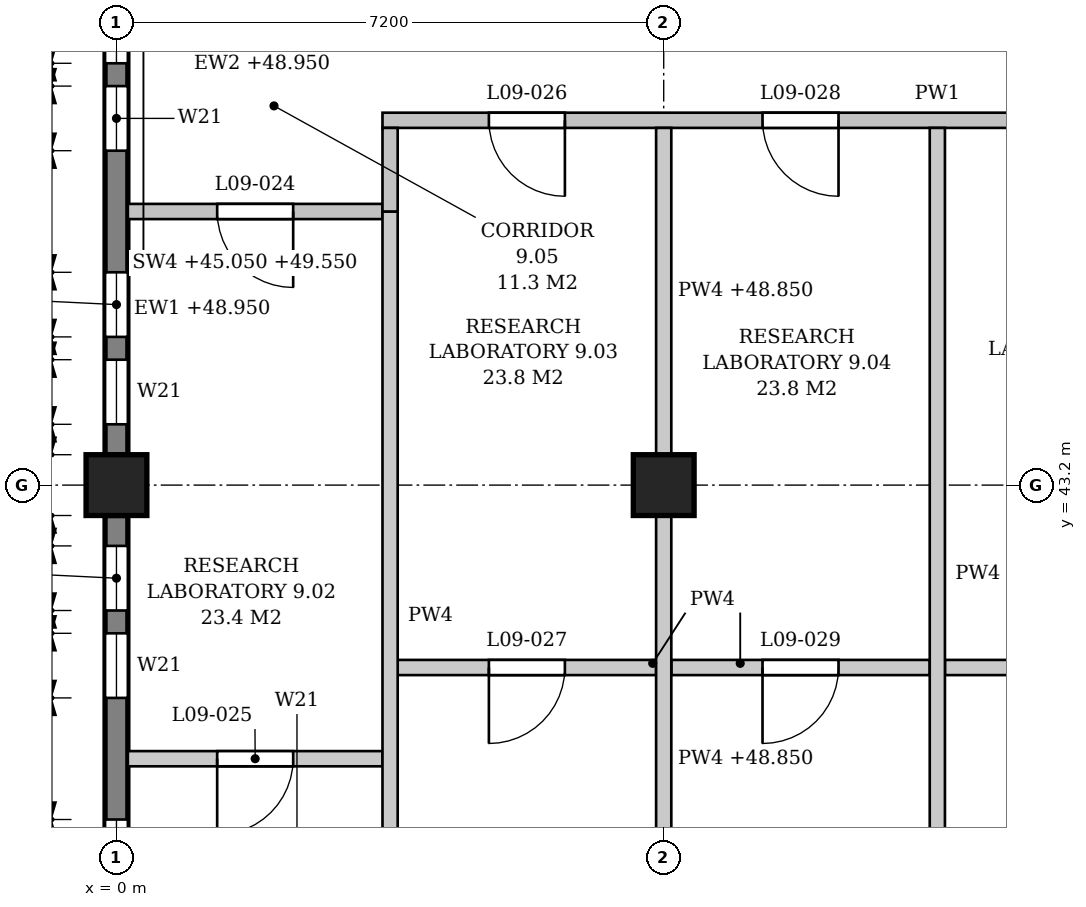
"""IFC4 building model, lengths in metres.
Left out: names, types, materials, properties, quantities, classifications, styles, units other than length and angle.
Written with IfcOpenShell. Run it as: python <this file> out.ifc"""

import sys

from ifc_helpers import new_model, si_unit, direction, frame, frame_2d, origin, origin_2d, place, context, subcontext, project, spatial, polyline, rectangle, outline, extrude, element, fill, save


model = new_model("IFC4")
c1 = context("Model", 3, precision=1e-05, world=origin(), true_north=direction((0.0, 1.0)))
c2 = subcontext(c1, "Body", "Model", "MODEL_VIEW")
j1 = project(units=[si_unit("LENGTHUNIT", "METRE"), si_unit("PLANEANGLEUNIT", "RADIAN")], contexts=[c1])
p1 = place(None, origin())
s1 = spatial("IfcSite", under=j1, at=p1, CompositionType="ELEMENT")
p2 = place(p1, origin())
s2 = spatial("IfcBuilding", under=s1, at=p2, CompositionType="ELEMENT")
p3 = place(p2, frame((0.0, 0.0, 45.3)))
s3 = spatial("IfcBuildingStorey", under=s2, at=p3, CompositionType="ELEMENT", Elevation=45.3)
for number, where, z_axis, x_axis in (
    (1, (0.0, 43.2, 0.0), (0.0, 0.0, 1.0), (1.0, 0.0, 0.0)),
    (2, (7.2, 43.2, 0.0), (0.0, 0.0, 1.0), (1.0, 0.0, 0.0)),
):
    element("IfcColumn", number, at=place(p3, frame(where, z_axis=z_axis, x_axis=x_axis)), inside=s3, PredefinedType="COLUMN", context=c2, shape_type="SweptSolid", body=[
        extrude(rectangle(XDim=0.8, YDim=0.8, at=origin_2d()), origin(), (0.0, 0.0, 1.0), 4.5),
    ])
p4 = place(p3, frame((0.0, 36.4, 0.0), z_axis=(0.0, 0.0, 1.0), x_axis=(0.0, 1.0, 0.0)))
e3 = element("IfcWall", 3, at=p4, inside=s3, PredefinedType="STANDARD", context=c2, shape_type="SweptSolid", body=[
    extrude(rectangle(XDim=6.4, YDim=0.3, at=frame_2d((3.2, 0.0))), origin(), (0.0, 0.0, 1.0), 3.65),
])
p5 = place(p4, frame((0.4, 0.0, 0.9)))
e4 = element("IfcOpeningElement", 4, at=p5, cuts=e3, PredefinedType="OPENING", context=c2, shape_type="SweptSolid", body=[
    extrude(outline(polyline([(0.0, 0.0), (0.85, 0.0), (0.85, 2.25), (0.425, 2.7), (0.0, 2.25), (0.0, 0.0)])), frame((0.0, 0.16, 0.0), z_axis=(0.0, -1.0, 0.0), x_axis=(1.0, 0.0, 0.0)), (0.0, 0.0, 1.0), 0.32),
])
p6 = place(p4, frame((1.55, 0.0, 0.9)))
e5 = element("IfcOpeningElement", 5, at=p6, cuts=e3, PredefinedType="OPENING", context=c2, shape_type="SweptSolid", body=[
    extrude(outline(polyline([(0.0, 0.0), (0.85, 0.0), (0.85, 2.25), (0.425, 2.7), (0.0, 2.25), (0.0, 0.0)])), frame((0.0, 0.16, 0.0), z_axis=(0.0, -1.0, 0.0), x_axis=(1.0, 0.0, 0.0)), (0.0, 0.0, 1.0), 0.32),
])
p7 = place(p4, frame((4.0, 0.0, 0.9)))
e6 = element("IfcOpeningElement", 6, at=p7, cuts=e3, PredefinedType="OPENING", context=c2, shape_type="SweptSolid", body=[
    extrude(outline(polyline([(0.0, 0.0), (0.85, 0.0), (0.85, 2.25), (0.425, 2.7), (0.0, 2.25), (0.0, 0.0)])), frame((0.0, 0.16, 0.0), z_axis=(0.0, -1.0, 0.0), x_axis=(1.0, 0.0, 0.0)), (0.0, 0.0, 1.0), 0.32),
])
p8 = place(p4, frame((5.15, 0.0, 0.9)))
e7 = element("IfcOpeningElement", 7, at=p8, cuts=e3, PredefinedType="OPENING", context=c2, shape_type="SweptSolid", body=[
    extrude(outline(polyline([(0.0, 0.0), (0.85, 0.0), (0.85, 2.25), (0.425, 2.7), (0.0, 2.25), (0.0, 0.0)])), frame((0.0, 0.16, 0.0), z_axis=(0.0, -1.0, 0.0), x_axis=(1.0, 0.0, 0.0)), (0.0, 0.0, 1.0), 0.32),
])
p9 = place(p3, frame((0.0, 43.6, 0.0), z_axis=(0.0, 0.0, 1.0), x_axis=(0.0, 1.0, 0.0)))
e8 = element("IfcWall", 8, at=p9, inside=s3, PredefinedType="STANDARD", context=c2, shape_type="SweptSolid", body=[
    extrude(rectangle(XDim=6.4, YDim=0.3, at=frame_2d((3.2, 0.0))), origin(), (0.0, 0.0, 1.0), 3.65),
])
p10 = place(p9, frame((0.4, 0.0, 0.9)))
e9 = element("IfcOpeningElement", 9, at=p10, cuts=e8, PredefinedType="OPENING", context=c2, shape_type="SweptSolid", body=[
    extrude(outline(polyline([(0.0, 0.0), (0.85, 0.0), (0.85, 2.25), (0.425, 2.7), (0.0, 2.25), (0.0, 0.0)])), frame((0.0, 0.16, 0.0), z_axis=(0.0, -1.0, 0.0), x_axis=(1.0, 0.0, 0.0)), (0.0, 0.0, 1.0), 0.32),
])
p11 = place(p9, frame((1.55, 0.0, 0.9)))
e10 = element("IfcOpeningElement", 10, at=p11, cuts=e8, PredefinedType="OPENING", context=c2, shape_type="SweptSolid", body=[
    extrude(outline(polyline([(0.0, 0.0), (0.85, 0.0), (0.85, 2.25), (0.425, 2.7), (0.0, 2.25), (0.0, 0.0)])), frame((0.0, 0.16, 0.0), z_axis=(0.0, -1.0, 0.0), x_axis=(1.0, 0.0, 0.0)), (0.0, 0.0, 1.0), 0.32),
])
p12 = place(p9, frame((4.0, 0.0, 0.9)))
e11 = element("IfcOpeningElement", 11, at=p12, cuts=e8, PredefinedType="OPENING", context=c2, shape_type="SweptSolid", body=[
    extrude(outline(polyline([(0.0, 0.0), (0.85, 0.0), (0.85, 2.25), (0.425, 2.7), (0.0, 2.25), (0.0, 0.0)])), frame((0.0, 0.16, 0.0), z_axis=(0.0, -1.0, 0.0), x_axis=(1.0, 0.0, 0.0)), (0.0, 0.0, 1.0), 0.32),
])
p13 = place(p9, frame((5.15, 0.0, 0.9)))
e12 = element("IfcOpeningElement", 12, at=p13, cuts=e8, PredefinedType="OPENING", context=c2, shape_type="SweptSolid", body=[
    extrude(outline(polyline([(0.0, 0.0), (0.85, 0.0), (0.85, 2.25), (0.425, 2.7), (0.0, 2.25), (0.0, 0.0)])), frame((0.0, 0.16, 0.0), z_axis=(0.0, -1.0, 0.0), x_axis=(1.0, 0.0, 0.0)), (0.0, 0.0, 1.0), 0.32),
])
p14 = place(p3, frame((0.15, 39.6, 0.0), z_axis=(0.0, 0.0, 1.0), x_axis=(1.0, 0.0, 0.0)))
e13 = element("IfcWall", 13, at=p14, inside=s3, PredefinedType="PARTITIONING", context=c2, shape_type="SweptSolid", body=[
    extrude(outline(polyline([(0.0, 0.0), (3.35, 0.0), (3.35, 4.25), (0.05, 4.25), (0.05, 3.65), (0.0, 3.65), (0.0, 0.0)])), frame((0.0, 0.1, 0.0), z_axis=(0.0, -1.0, 0.0), x_axis=(1.0, 0.0, 0.0)), (0.0, 0.0, 1.0), 0.2),
])
p15 = place(p14, frame((1.175, 0.0, 0.0)))
e14 = element("IfcOpeningElement", 14, at=p15, cuts=e13, PredefinedType="OPENING", context=c2, shape_type="SweptSolid", body=[
    extrude(rectangle(XDim=1.0, YDim=2.1, at=frame_2d((0.5, 1.05))), frame((0.0, 0.11, 0.0), z_axis=(0.0, -1.0, 0.0), x_axis=(1.0, 0.0, 0.0)), (0.0, 0.0, 1.0), 0.22),
])
p16 = place(p3, frame((3.7, 40.8, 0.0), z_axis=(0.0, 0.0, 1.0), x_axis=(1.0, 0.0, 0.0)))
e15 = element("IfcWall", 15, at=p16, inside=s3, PredefinedType="PARTITIONING", context=c2, shape_type="SweptSolid", body=[
    extrude(outline(polyline([(0.0, 0.0), (3.4, 0.0), (3.4, 3.55), (3.275, 3.55), (3.275, 4.25), (0.0, 4.25), (0.0, 0.0)])), frame((0.0, 0.1, 0.0), z_axis=(0.0, -1.0, 0.0), x_axis=(1.0, 0.0, 0.0)), (0.0, 0.0, 1.0), 0.2),
])
p17 = place(p16, frame((1.2, 0.0, 0.0)))
e16 = element("IfcOpeningElement", 16, at=p17, cuts=e15, PredefinedType="OPENING", context=c2, shape_type="SweptSolid", body=[
    extrude(rectangle(XDim=1.0, YDim=2.1, at=frame_2d((0.5, 1.05))), frame((0.0, 0.11, 0.0), z_axis=(0.0, -1.0, 0.0), x_axis=(1.0, 0.0, 0.0)), (0.0, 0.0, 1.0), 0.22),
])
p18 = place(p3, frame((7.3, 40.8, 0.0), z_axis=(0.0, 0.0, 1.0), x_axis=(1.0, 0.0, 0.0)))
e17 = element("IfcWall", 17, at=p18, inside=s3, PredefinedType="PARTITIONING", context=c2, shape_type="SweptSolid", body=[
    extrude(outline(polyline([(0.0, 0.0), (3.4, 0.0), (3.4, 4.25), (0.125, 4.25), (0.125, 3.55), (0.0, 3.55), (0.0, 0.0)])), frame((0.0, 0.1, 0.0), z_axis=(0.0, -1.0, 0.0), x_axis=(1.0, 0.0, 0.0)), (0.0, 0.0, 1.0), 0.2),
])
p19 = place(p18, frame((1.2, 0.0, 0.0)))
e18 = element("IfcOpeningElement", 18, at=p19, cuts=e17, PredefinedType="OPENING", context=c2, shape_type="SweptSolid", body=[
    extrude(rectangle(XDim=1.0, YDim=2.1, at=frame_2d((0.5, 1.05))), frame((0.0, 0.11, 0.0), z_axis=(0.0, -1.0, 0.0), x_axis=(1.0, 0.0, 0.0)), (0.0, 0.0, 1.0), 0.22),
])
p20 = place(p3, frame((10.9, 40.8, 0.0), z_axis=(0.0, 0.0, 1.0), x_axis=(1.0, 0.0, 0.0)))
e19 = element("IfcWall", 19, at=p20, inside=s3, PredefinedType="PARTITIONING", context=c2, shape_type="SweptSolid", body=[
    extrude(outline(polyline([(0.0, 0.0), (7.0, 0.0), (7.0, 4.25), (3.725, 4.25), (3.725, 3.55), (3.275, 3.55), (3.275, 4.25), (0.0, 4.25), (0.0, 0.0)])), frame((0.0, 0.1, 0.0), z_axis=(0.0, -1.0, 0.0), x_axis=(1.0, 0.0, 0.0)), (0.0, 0.0, 1.0), 0.2),
])
p21 = place(p20, frame((1.25, 0.0, 0.0)))
e20 = element("IfcOpeningElement", 20, at=p21, cuts=e19, PredefinedType="OPENING", context=c2, shape_type="SweptSolid", body=[
    extrude(rectangle(XDim=1.0, YDim=2.1, at=frame_2d((0.5, 1.05))), frame((0.0, 0.11, 0.0), z_axis=(0.0, -1.0, 0.0), x_axis=(1.0, 0.0, 0.0)), (0.0, 0.0, 1.0), 0.22),
])
p22 = place(p20, frame((4.75, 0.0, 0.0)))
e21 = element("IfcOpeningElement", 21, at=p22, cuts=e19, PredefinedType="OPENING", context=c2, shape_type="SweptSolid", body=[
    extrude(rectangle(XDim=1.0, YDim=2.1, at=frame_2d((0.5, 1.05))), frame((0.0, 0.11, 0.0), z_axis=(0.0, -1.0, 0.0), x_axis=(1.0, 0.0, 0.0)), (0.0, 0.0, 1.0), 0.22),
])
p23 = place(p3, frame((0.15, 46.8, 0.0), z_axis=(0.0, 0.0, 1.0), x_axis=(1.0, 0.0, 0.0)))
e22 = element("IfcWall", 22, at=p23, inside=s3, PredefinedType="PARTITIONING", context=c2, shape_type="SweptSolid", body=[
    extrude(outline(polyline([(0.0, 0.0), (3.35, 0.0), (3.35, 4.25), (0.05, 4.25), (0.05, 3.65), (0.0, 3.65), (0.0, 0.0)])), frame((0.0, 0.1, 0.0), z_axis=(0.0, -1.0, 0.0), x_axis=(1.0, 0.0, 0.0)), (0.0, 0.0, 1.0), 0.2),
])
p24 = place(p23, frame((1.175, 0.0, 0.0)))
e23 = element("IfcOpeningElement", 23, at=p24, cuts=e22, PredefinedType="OPENING", context=c2, shape_type="SweptSolid", body=[
    extrude(rectangle(XDim=1.0, YDim=2.1, at=frame_2d((0.5, 1.05))), frame((0.0, 0.11, 0.0), z_axis=(0.0, -1.0, 0.0), x_axis=(1.0, 0.0, 0.0)), (0.0, 0.0, 1.0), 0.22),
])
p25 = place(p3, frame((3.5, 48.0, 0.0), z_axis=(0.0, 0.0, 1.0), x_axis=(1.0, 0.0, 0.0)))
e24 = element("IfcWall", 24, at=p25, inside=s3, PredefinedType="PARTITIONING", context=c2, shape_type="SweptSolid", body=[
    extrude(outline(polyline([(0.0, 0.0), (14.6, 0.0), (14.6, 4.25), (11.125, 4.25), (11.125, 3.55), (10.675, 3.55), (10.675, 4.25), (3.925, 4.25), (3.925, 3.55), (3.475, 3.55), (3.475, 4.25), (0.0, 4.25), (0.0, 0.0)])), frame((0.0, 0.1, 0.0), z_axis=(0.0, -1.0, 0.0), x_axis=(1.0, 0.0, 0.0)), (0.0, 0.0, 1.0), 0.2),
])
p26 = place(p25, frame((1.4, 0.0, 0.0)))
e25 = element("IfcOpeningElement", 25, at=p26, cuts=e24, PredefinedType="OPENING", context=c2, shape_type="SweptSolid", body=[
    extrude(rectangle(XDim=1.0, YDim=2.1, at=frame_2d((0.5, 1.05))), frame((0.0, 0.11, 0.0), z_axis=(0.0, -1.0, 0.0), x_axis=(1.0, 0.0, 0.0)), (0.0, 0.0, 1.0), 0.22),
])
p27 = place(p25, frame((5.0, 0.0, 0.0)))
e26 = element("IfcOpeningElement", 26, at=p27, cuts=e24, PredefinedType="OPENING", context=c2, shape_type="SweptSolid", body=[
    extrude(rectangle(XDim=1.0, YDim=2.1, at=frame_2d((0.5, 1.05))), frame((0.0, 0.11, 0.0), z_axis=(0.0, -1.0, 0.0), x_axis=(1.0, 0.0, 0.0)), (0.0, 0.0, 1.0), 0.22),
])
p28 = place(p3, frame((3.6, 36.15, 0.0), z_axis=(0.0, 0.0, 1.0), x_axis=(0.0, 1.0, 0.0)))
e27 = element("IfcWall", 27, at=p28, inside=s3, PredefinedType="PARTITIONING", context=c2, shape_type="SweptSolid", body=[
    extrude(outline(polyline([(0.0, 0.0), (10.65, 0.0), (10.65, 4.25), (7.275, 4.25), (7.275, 3.55), (6.825, 3.55), (6.825, 4.25), (0.05, 4.25), (0.05, 3.65), (0.0, 3.65), (0.0, 0.0)])), frame((0.0, 0.1, 0.0), z_axis=(0.0, -1.0, 0.0), x_axis=(1.0, 0.0, 0.0)), (0.0, 0.0, 1.0), 0.2),
])
p29 = place(p3, frame((3.6, 46.8, 0.0), z_axis=(0.0, 0.0, 1.0), x_axis=(0.0, 1.0, 0.0)))
e28 = element("IfcWall", 28, at=p29, inside=s3, PredefinedType="PARTITIONING", context=c2, shape_type="SweptSolid", body=[
    extrude(rectangle(XDim=1.1, YDim=0.2, at=frame_2d((0.55, 0.0))), origin(), (0.0, 0.0, 1.0), 4.25),
])
p30 = place(p3, frame((7.2, 36.4, 0.0), z_axis=(0.0, 0.0, 1.0), x_axis=(0.0, 1.0, 0.0)))
e29 = element("IfcWall", 29, at=p30, inside=s3, PredefinedType="PARTITIONING", context=c2, shape_type="SweptSolid", body=[
    extrude(rectangle(XDim=6.4, YDim=0.2, at=frame_2d((3.2, 0.0))), origin(), (0.0, 0.0, 1.0), 3.55),
])
p31 = place(p3, frame((7.2, 43.6, 0.0), z_axis=(0.0, 0.0, 1.0), x_axis=(0.0, 1.0, 0.0)))
e30 = element("IfcWall", 30, at=p31, inside=s3, PredefinedType="PARTITIONING", context=c2, shape_type="SweptSolid", body=[
    extrude(rectangle(XDim=4.3, YDim=0.2, at=frame_2d((2.15, 0.0))), origin(), (0.0, 0.0, 1.0), 3.55),
])
p32 = place(p3, frame((10.8, 36.15, 0.0), z_axis=(0.0, 0.0, 1.0), x_axis=(0.0, 1.0, 0.0)))
e31 = element("IfcWall", 31, at=p32, inside=s3, PredefinedType="PARTITIONING", context=c2, shape_type="SweptSolid", body=[
    extrude(outline(polyline([(0.0, 0.0), (11.75, 0.0), (11.75, 4.25), (7.275, 4.25), (7.275, 3.55), (6.825, 3.55), (6.825, 4.25), (0.05, 4.25), (0.05, 3.65), (0.0, 3.65), (0.0, 0.0)])), frame((0.0, 0.1, 0.0), z_axis=(0.0, -1.0, 0.0), x_axis=(1.0, 0.0, 0.0)), (0.0, 0.0, 1.0), 0.2),
])
p33 = place(p6, origin())
e32 = element("IfcWindow", 32, at=p33, inside=s3, PartitioningType="SINGLE_PANEL", PredefinedType="WINDOW", context=c2, shape_type="SweptSolid", body=[
    extrude(outline(polyline([(0.0, 0.0), (0.85, 0.0), (0.85, 2.25), (0.425, 2.7), (0.0, 2.25), (0.0, 0.0)])), frame((0.0, 0.03, 0.0), z_axis=(0.0, -1.0, 0.0), x_axis=(1.0, 0.0, 0.0)), (0.0, 0.0, 1.0), 0.06),
])
fill(e5, e32)
p34 = place(p7, origin())
e33 = element("IfcWindow", 33, at=p34, inside=s3, PartitioningType="SINGLE_PANEL", PredefinedType="WINDOW", context=c2, shape_type="SweptSolid", body=[
    extrude(outline(polyline([(0.0, 0.0), (0.85, 0.0), (0.85, 2.25), (0.425, 2.7), (0.0, 2.25), (0.0, 0.0)])), frame((0.0, 0.03, 0.0), z_axis=(0.0, -1.0, 0.0), x_axis=(1.0, 0.0, 0.0)), (0.0, 0.0, 1.0), 0.06),
])
fill(e6, e33)
p35 = place(p8, origin())
e34 = element("IfcWindow", 34, at=p35, inside=s3, PartitioningType="SINGLE_PANEL", PredefinedType="WINDOW", context=c2, shape_type="SweptSolid", body=[
    extrude(outline(polyline([(0.0, 0.0), (0.85, 0.0), (0.85, 2.25), (0.425, 2.7), (0.0, 2.25), (0.0, 0.0)])), frame((0.0, 0.03, 0.0), z_axis=(0.0, -1.0, 0.0), x_axis=(1.0, 0.0, 0.0)), (0.0, 0.0, 1.0), 0.06),
])
fill(e7, e34)
p36 = place(p10, origin())
e35 = element("IfcWindow", 35, at=p36, inside=s3, PartitioningType="SINGLE_PANEL", PredefinedType="WINDOW", context=c2, shape_type="SweptSolid", body=[
    extrude(outline(polyline([(0.0, 0.0), (0.85, 0.0), (0.85, 2.25), (0.425, 2.7), (0.0, 2.25), (0.0, 0.0)])), frame((0.0, 0.03, 0.0), z_axis=(0.0, -1.0, 0.0), x_axis=(1.0, 0.0, 0.0)), (0.0, 0.0, 1.0), 0.06),
])
fill(e9, e35)
p37 = place(p11, origin())
e36 = element("IfcWindow", 36, at=p37, inside=s3, PartitioningType="SINGLE_PANEL", PredefinedType="WINDOW", context=c2, shape_type="SweptSolid", body=[
    extrude(outline(polyline([(0.0, 0.0), (0.85, 0.0), (0.85, 2.25), (0.425, 2.7), (0.0, 2.25), (0.0, 0.0)])), frame((0.0, 0.03, 0.0), z_axis=(0.0, -1.0, 0.0), x_axis=(1.0, 0.0, 0.0)), (0.0, 0.0, 1.0), 0.06),
])
fill(e10, e36)
p38 = place(p12, origin())
e37 = element("IfcWindow", 37, at=p38, inside=s3, PartitioningType="SINGLE_PANEL", PredefinedType="WINDOW", context=c2, shape_type="SweptSolid", body=[
    extrude(outline(polyline([(0.0, 0.0), (0.85, 0.0), (0.85, 2.25), (0.425, 2.7), (0.0, 2.25), (0.0, 0.0)])), frame((0.0, 0.03, 0.0), z_axis=(0.0, -1.0, 0.0), x_axis=(1.0, 0.0, 0.0)), (0.0, 0.0, 1.0), 0.06),
])
fill(e11, e37)
p39 = place(p13, origin())
e38 = element("IfcWindow", 38, at=p39, inside=s3, PartitioningType="SINGLE_PANEL", PredefinedType="WINDOW", context=c2, shape_type="SweptSolid", body=[
    extrude(outline(polyline([(0.0, 0.0), (0.85, 0.0), (0.85, 2.25), (0.425, 2.7), (0.0, 2.25), (0.0, 0.0)])), frame((0.0, 0.03, 0.0), z_axis=(0.0, -1.0, 0.0), x_axis=(1.0, 0.0, 0.0)), (0.0, 0.0, 1.0), 0.06),
])
fill(e12, e38)
p40 = place(p24, frame((1.0, 0.0, 0.0), z_axis=(0.0, 0.0, 1.0), x_axis=(-1.0, 0.0, 0.0)))
e39 = element("IfcDoor", 39, at=p40, inside=s3, OperationType="SINGLE_SWING_LEFT", PredefinedType="DOOR", context=c2, shape_type="SweptSolid", body=[
    extrude(rectangle(XDim=1.0, YDim=2.1, at=frame_2d((0.5, 1.05))), frame((0.0, 0.025, 0.0), z_axis=(0.0, -1.0, 0.0), x_axis=(1.0, 0.0, 0.0)), (0.0, 0.0, 1.0), 0.05),
])
fill(e23, e39)
p41 = place(p15, frame((1.0, 0.0, 0.0), z_axis=(0.0, 0.0, 1.0), x_axis=(-1.0, 0.0, 0.0)))
e40 = element("IfcDoor", 40, at=p41, inside=s3, OperationType="SINGLE_SWING_RIGHT", PredefinedType="DOOR", context=c2, shape_type="SweptSolid", body=[
    extrude(rectangle(XDim=1.0, YDim=2.1, at=frame_2d((0.5, 1.05))), frame((0.0, 0.025, 0.0), z_axis=(0.0, -1.0, 0.0), x_axis=(1.0, 0.0, 0.0)), (0.0, 0.0, 1.0), 0.05),
])
fill(e14, e40)
p42 = place(p26, frame((1.0, 0.0, 0.0), z_axis=(0.0, 0.0, 1.0), x_axis=(-1.0, 0.0, 0.0)))
e41 = element("IfcDoor", 41, at=p42, inside=s3, OperationType="SINGLE_SWING_LEFT", PredefinedType="DOOR", context=c2, shape_type="SweptSolid", body=[
    extrude(rectangle(XDim=1.0, YDim=2.1, at=frame_2d((0.5, 1.05))), frame((0.0, 0.025, 0.0), z_axis=(0.0, -1.0, 0.0), x_axis=(1.0, 0.0, 0.0)), (0.0, 0.0, 1.0), 0.05),
])
fill(e25, e41)
p43 = place(p17, frame((1.0, 0.0, 0.0), z_axis=(0.0, 0.0, 1.0), x_axis=(-1.0, 0.0, 0.0)))
e42 = element("IfcDoor", 42, at=p43, inside=s3, OperationType="SINGLE_SWING_RIGHT", PredefinedType="DOOR", context=c2, shape_type="SweptSolid", body=[
    extrude(rectangle(XDim=1.0, YDim=2.1, at=frame_2d((0.5, 1.05))), frame((0.0, 0.025, 0.0), z_axis=(0.0, -1.0, 0.0), x_axis=(1.0, 0.0, 0.0)), (0.0, 0.0, 1.0), 0.05),
])
fill(e16, e42)
p44 = place(p27, frame((1.0, 0.0, 0.0), z_axis=(0.0, 0.0, 1.0), x_axis=(-1.0, 0.0, 0.0)))
e43 = element("IfcDoor", 43, at=p44, inside=s3, OperationType="SINGLE_SWING_LEFT", PredefinedType="DOOR", context=c2, shape_type="SweptSolid", body=[
    extrude(rectangle(XDim=1.0, YDim=2.1, at=frame_2d((0.5, 1.05))), frame((0.0, 0.025, 0.0), z_axis=(0.0, -1.0, 0.0), x_axis=(1.0, 0.0, 0.0)), (0.0, 0.0, 1.0), 0.05),
])
fill(e26, e43)
p45 = place(p19, frame((1.0, 0.0, 0.0), z_axis=(0.0, 0.0, 1.0), x_axis=(-1.0, 0.0, 0.0)))
e44 = element("IfcDoor", 44, at=p45, inside=s3, OperationType="SINGLE_SWING_RIGHT", PredefinedType="DOOR", context=c2, shape_type="SweptSolid", body=[
    extrude(rectangle(XDim=1.0, YDim=2.1, at=frame_2d((0.5, 1.05))), frame((0.0, 0.025, 0.0), z_axis=(0.0, -1.0, 0.0), x_axis=(1.0, 0.0, 0.0)), (0.0, 0.0, 1.0), 0.05),
])
fill(e18, e44)
save(model, sys.argv[1])
